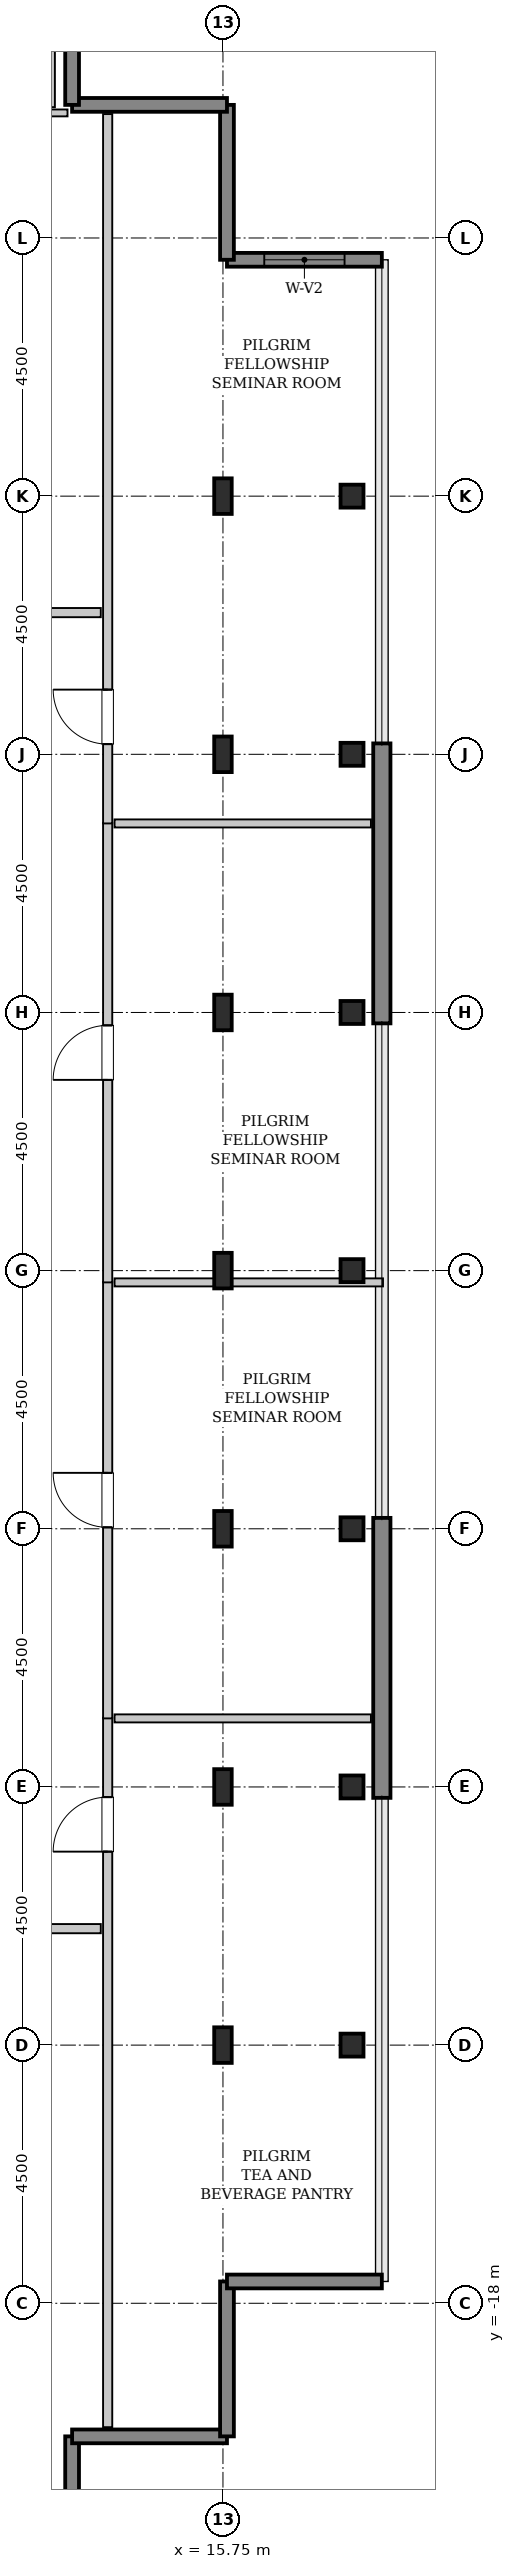
"""IFC4 building model, lengths in metres.
Left out: names, types, materials, properties, quantities, classifications, styles, units other than length and angle.
Written with IfcOpenShell. Run it as: python <this file> out.ifc"""

import sys

from ifc_helpers import new_model, si_unit, direction, frame, frame_2d, origin, origin_2d, place, context, subcontext, project, spatial, rectangle, hollow_rectangle, i_section, extrude, source, transform, mapped, element, fill, save


model = new_model("IFC4")
c1 = context("Model", 3, precision=1e-05, world=origin(), true_north=direction((0.0, 1.0)))
c2 = subcontext(c1, "Body", "Model", "MODEL_VIEW")
j1 = project(units=[si_unit("LENGTHUNIT", "METRE"), si_unit("PLANEANGLEUNIT", "RADIAN")], contexts=[c1])
p1 = place(None, origin())
s1 = spatial("IfcSite", under=j1, at=p1, CompositionType="ELEMENT")
p2 = place(p1, origin())
s2 = spatial("IfcBuilding", under=s1, at=p2, CompositionType="ELEMENT")
p3 = place(p2, frame((0.0, 0.0, 345.2)))
s3 = spatial("IfcBuildingStorey", under=s2, at=p3, CompositionType="ELEMENT", Elevation=345.2)
m1 = source(origin(), c2, "Body", "SweptSolid", [
    extrude(i_section(OverallWidth=0.305, OverallDepth=0.62, WebThickness=0.021, FlangeThickness=0.04, FilletRadius=0.027, at=origin_2d()), origin(), (0.0, 0.0, 1.0), 3.8),
])
for number, where, z_axis, x_axis in (
    (1, (15.75, -13.5, 0.0), (0.0, 0.0, 1.0), (1.0, 0.0, 0.0)),
    (2, (15.75, -9.0, 0.0), (0.0, 0.0, 1.0), (1.0, 0.0, 0.0)),
    (3, (15.75, -4.5, 0.0), (0.0, 0.0, 1.0), (1.0, 0.0, 0.0)),
    (4, (15.75, 0.0, 0.0), (0.0, 0.0, 1.0), (1.0, 0.0, 0.0)),
    (5, (15.75, 4.5, 0.0), (0.0, 0.0, 1.0), (1.0, 0.0, 0.0)),
    (6, (15.75, 9.0, 0.0), (0.0, 0.0, 1.0), (1.0, 0.0, 0.0)),
    (7, (15.75, 13.5, 0.0), (0.0, 0.0, 1.0), (1.0, 0.0, 0.0)),
):
    element("IfcColumn", number, at=place(p3, frame(where, z_axis=z_axis, x_axis=x_axis)), inside=s3, PredefinedType="COLUMN", context=c2, shape_type="MappedRepresentation", body=[
        mapped(m1, transform((0.0, 0.0, 0.0), x_axis=(1.0, 0.0, 0.0), y_axis=(0.0, 1.0, 0.0), z_axis=(0.0, 0.0, 1.0), scale=1.0)),
    ])
m2 = source(origin(), c2, "Body", "SweptSolid", [
    extrude(hollow_rectangle(XDim=0.4, YDim=0.4, WallThickness=0.02, InnerFilletRadius=0.02, OuterFilletRadius=0.04, at=origin_2d()), origin(), (0.0, 0.0, 1.0), 3.8),
])
for number, where, z_axis, x_axis in (
    (8, (18.0, -13.5, 0.0), (0.0, 0.0, 1.0), (1.0, 0.0, 0.0)),
    (9, (18.0, -9.0, 0.0), (0.0, 0.0, 1.0), (1.0, 0.0, 0.0)),
    (10, (18.0, -4.5, 0.0), (0.0, 0.0, 1.0), (1.0, 0.0, 0.0)),
    (11, (18.0, 0.0, 0.0), (0.0, 0.0, 1.0), (1.0, 0.0, 0.0)),
    (12, (18.0, 4.5, 0.0), (0.0, 0.0, 1.0), (1.0, 0.0, 0.0)),
    (13, (18.0, 9.0, 0.0), (0.0, 0.0, 1.0), (1.0, 0.0, 0.0)),
    (14, (18.0, 13.5, 0.0), (0.0, 0.0, 1.0), (1.0, 0.0, 0.0)),
):
    element("IfcColumn", number, at=place(p3, frame(where, z_axis=z_axis, x_axis=x_axis)), inside=s3, PredefinedType="COLUMN", context=c2, shape_type="MappedRepresentation", body=[
        mapped(m2, transform((0.0, 0.0, 0.0), x_axis=(1.0, 0.0, 0.0), y_axis=(0.0, 1.0, 0.0), z_axis=(0.0, 0.0, 1.0), scale=1.0)),
    ])
m3 = source(origin(), c2, "Body", "SweptSolid", [
    extrude(rectangle(XDim=4.88, YDim=0.3, at=frame_2d((2.44, 0.0))), origin(), (0.0, 0.0, 1.0), 3.5),
])
for number, where, z_axis, x_axis in (
    (15, (18.52, -9.19, 0.0), (0.0, 0.0, 1.0), (0.0, 1.0, 0.0)),
    (16, (18.52, 4.31, 0.0), (0.0, 0.0, 1.0), (0.0, 1.0, 0.0)),
):
    element("IfcWall", number, at=place(p3, frame(where, z_axis=z_axis, x_axis=x_axis)), inside=s3, PredefinedType="SHEAR", context=c2, shape_type="MappedRepresentation", body=[
        mapped(m3, transform((0.0, 0.0, 0.0), x_axis=(1.0, 0.0, 0.0), y_axis=(0.0, 1.0, 0.0), z_axis=(0.0, 0.0, 1.0), scale=1.0)),
    ])
m4 = source(origin(), c2, "Body", "SweptSolid", [
    extrude(rectangle(XDim=2.7, YDim=0.24, at=frame_2d((1.35, 0.0))), origin(), (0.0, 0.0, 1.0), 3.5),
])
p4 = place(p3, frame((18.52, 17.62, 0.0), z_axis=(0.0, 0.0, 1.0), x_axis=(-1.0, 0.0, 0.0)))
e17 = element("IfcWall", 17, at=p4, inside=s3, PredefinedType="SHEAR", context=c2, shape_type="MappedRepresentation", body=[
    mapped(m4, transform((0.0, 0.0, 0.0), x_axis=(1.0, 0.0, 0.0), y_axis=(0.0, 1.0, 0.0), z_axis=(0.0, 0.0, 1.0), scale=1.0)),
])
p5 = place(p4, frame((0.65, 0.0, 0.85)))
e18 = element("IfcOpeningElement", 18, at=p5, cuts=e17, PredefinedType="OPENING", context=c2, shape_type="SweptSolid", body=[
    extrude(rectangle(XDim=1.4, YDim=1.8, at=frame_2d((0.7, 0.9))), frame((0.0, 0.13, 0.0), z_axis=(0.0, -1.0, 0.0), x_axis=(1.0, 0.0, 0.0)), (0.0, 0.0, 1.0), 0.26),
])
for number, where, z_axis, x_axis in (
    (19, (15.82, 17.62, 0.0), (0.0, 0.0, 1.0), (0.0, 1.0, 0.0)),
    (20, (15.82, 20.32, 0.0), (0.0, 0.0, 1.0), (-1.0, 0.0, 0.0)),
    (21, (13.12, 20.32, 0.0), (0.0, 0.0, 1.0), (0.0, 1.0, 0.0)),
    (22, (13.12, -23.02, 0.0), (0.0, 0.0, 1.0), (0.0, 1.0, 0.0)),
    (23, (13.12, -20.32, 0.0), (0.0, 0.0, 1.0), (1.0, 0.0, 0.0)),
    (24, (15.82, -20.32, 0.0), (0.0, 0.0, 1.0), (0.0, 1.0, 0.0)),
    (25, (15.82, -17.62, 0.0), (0.0, 0.0, 1.0), (1.0, 0.0, 0.0)),
):
    element("IfcWall", number, at=place(p3, frame(where, z_axis=z_axis, x_axis=x_axis)), inside=s3, PredefinedType="SHEAR", context=c2, shape_type="MappedRepresentation", body=[
        mapped(m4, transform((0.0, 0.0, 0.0), x_axis=(1.0, 0.0, 0.0), y_axis=(0.0, 1.0, 0.0), z_axis=(0.0, 0.0, 1.0), scale=1.0)),
    ])
m5 = source(origin(), c2, "Body", "SweptSolid", [
    extrude(rectangle(XDim=2.86, YDim=0.12, at=frame_2d((1.43, 0.0))), origin(), (0.0, 0.0, 1.0), 3.485),
])
p6 = place(p3, frame((10.18, 20.18, 0.0), z_axis=(0.0, 0.0, 1.0), x_axis=(1.0, 0.0, 0.0)))
e26 = element("IfcWall", 26, at=p6, inside=s3, PredefinedType="PLUMBINGWALL", context=c2, shape_type="MappedRepresentation", body=[
    mapped(m5, transform((0.0, 0.0, 0.0), x_axis=(1.0, 0.0, 0.0), y_axis=(0.0, 1.0, 0.0), z_axis=(0.0, 0.0, 1.0), scale=1.0)),
])
p7 = place(p6, frame((0.895, 0.0, 0.0)))
e27 = element("IfcOpeningElement", 27, at=p7, cuts=e26, PredefinedType="OPENING", context=c2, shape_type="SweptSolid", body=[
    extrude(rectangle(XDim=0.85, YDim=2.1, at=frame_2d((0.425, 1.05))), frame((0.0, 0.07, 0.0), z_axis=(0.0, -1.0, 0.0), x_axis=(1.0, 0.0, 0.0)), (0.0, 0.0, 1.0), 0.14),
])
m6 = source(origin(), c2, "Body", "SweptSolid", [
    extrude(rectangle(XDim=2.76, YDim=0.12, at=frame_2d((1.38, 0.0))), origin(), (0.0, 0.0, 1.0), 3.485),
])
p8 = place(p3, frame((12.76, 20.28, 0.0), z_axis=(0.0, 0.0, 1.0), x_axis=(0.0, 1.0, 0.0)))
e28 = element("IfcWall", 28, at=p8, inside=s3, PredefinedType="PLUMBINGWALL", context=c2, shape_type="MappedRepresentation", body=[
    mapped(m6, transform((0.0, 0.0, 0.0), x_axis=(1.0, 0.0, 0.0), y_axis=(0.0, 1.0, 0.0), z_axis=(0.0, 0.0, 1.0), scale=1.0)),
])
m7 = source(origin(), c2, "Body", "SweptSolid", [
    extrude(rectangle(XDim=12.365, YDim=0.16, at=frame_2d((6.183, 0.0))), origin(), (0.0, 0.0, 1.0), 3.485),
])
p9 = place(p3, frame((13.74, -20.16, 0.0), z_axis=(0.0, 0.0, 1.0), x_axis=(0.0, 1.0, 0.0)))
e29 = element("IfcWall", 29, at=p9, inside=s3, PredefinedType="PARTITIONING", context=c2, shape_type="MappedRepresentation", body=[
    mapped(m7, transform((0.0, 0.0, 0.0), x_axis=(1.0, 0.0, 0.0), y_axis=(0.0, 1.0, 0.0), z_axis=(0.0, 0.0, 1.0), scale=1.0)),
])
p10 = place(p9, frame((10.032, 0.0, 0.0)))
e30 = element("IfcOpeningElement", 30, at=p10, cuts=e29, PredefinedType="OPENING", context=c2, shape_type="SweptSolid", body=[
    extrude(rectangle(XDim=0.95, YDim=2.1, at=frame_2d((0.475, 1.05))), frame((0.0, 0.09, 0.0), z_axis=(0.0, -1.0, 0.0), x_axis=(1.0, 0.0, 0.0)), (0.0, 0.0, 1.0), 0.18),
])
m8 = source(origin(), c2, "Body", "SweptSolid", [
    extrude(rectangle(XDim=4.47, YDim=0.14, at=frame_2d((2.235, 0.0))), origin(), (0.0, 0.0, 1.0), 3.485),
])
p11 = place(p3, frame((13.86, -7.805, 0.0), z_axis=(0.0, 0.0, 1.0), x_axis=(1.0, 0.0, 0.0)))
e31 = element("IfcWall", 31, at=p11, inside=s3, PredefinedType="PARTITIONING", context=c2, shape_type="MappedRepresentation", body=[
    mapped(m8, transform((0.0, 0.0, 0.0), x_axis=(1.0, 0.0, 0.0), y_axis=(0.0, 1.0, 0.0), z_axis=(0.0, 0.0, 1.0), scale=1.0)),
])
m9 = source(origin(), c2, "Body", "SweptSolid", [
    extrude(rectangle(XDim=7.61, YDim=0.16, at=frame_2d((3.805, 0.0))), origin(), (0.0, 0.0, 1.0), 3.485),
])
p12 = place(p3, frame((13.74, -7.805, 0.0), z_axis=(0.0, 0.0, 1.0), x_axis=(0.0, 1.0, 0.0)))
e32 = element("IfcWall", 32, at=p12, inside=s3, PredefinedType="PARTITIONING", context=c2, shape_type="MappedRepresentation", body=[
    mapped(m9, transform((0.0, 0.0, 0.0), x_axis=(1.0, 0.0, 0.0), y_axis=(0.0, 1.0, 0.0), z_axis=(0.0, 0.0, 1.0), scale=1.0)),
])
p13 = place(p12, frame((3.33, 0.0, 0.0)))
e33 = element("IfcOpeningElement", 33, at=p13, cuts=e32, PredefinedType="OPENING", context=c2, shape_type="SweptSolid", body=[
    extrude(rectangle(XDim=0.95, YDim=2.1, at=frame_2d((0.475, 1.05))), frame((0.0, 0.09, 0.0), z_axis=(0.0, -1.0, 0.0), x_axis=(1.0, 0.0, 0.0)), (0.0, 0.0, 1.0), 0.18),
])
m10 = source(origin(), c2, "Body", "SweptSolid", [
    extrude(rectangle(XDim=4.68, YDim=0.14, at=frame_2d((2.34, 0.0))), origin(), (0.0, 0.0, 1.0), 2.925),
])
p14 = place(p3, frame((13.86, -0.205, 0.0), z_axis=(0.0, 0.0, 1.0), x_axis=(1.0, 0.0, 0.0)))
e34 = element("IfcWall", 34, at=p14, inside=s3, PredefinedType="PARTITIONING", context=c2, shape_type="MappedRepresentation", body=[
    mapped(m10, transform((0.0, 0.0, 0.0), x_axis=(1.0, 0.0, 0.0), y_axis=(0.0, 1.0, 0.0), z_axis=(0.0, 0.0, 1.0), scale=1.0)),
])
m11 = source(origin(), c2, "Body", "SweptSolid", [
    extrude(rectangle(XDim=8.01, YDim=0.16, at=frame_2d((4.005, 0.0))), origin(), (0.0, 0.0, 1.0), 3.485),
])
p15 = place(p3, frame((13.74, -0.205, 0.0), z_axis=(0.0, 0.0, 1.0), x_axis=(0.0, 1.0, 0.0)))
e35 = element("IfcWall", 35, at=p15, inside=s3, PredefinedType="PARTITIONING", context=c2, shape_type="MappedRepresentation", body=[
    mapped(m11, transform((0.0, 0.0, 0.0), x_axis=(1.0, 0.0, 0.0), y_axis=(0.0, 1.0, 0.0), z_axis=(0.0, 0.0, 1.0), scale=1.0)),
])
p16 = place(p15, frame((3.53, 0.0, 0.0)))
e36 = element("IfcOpeningElement", 36, at=p16, cuts=e35, PredefinedType="OPENING", context=c2, shape_type="SweptSolid", body=[
    extrude(rectangle(XDim=0.95, YDim=2.1, at=frame_2d((0.475, 1.05))), frame((0.0, 0.09, 0.0), z_axis=(0.0, -1.0, 0.0), x_axis=(1.0, 0.0, 0.0)), (0.0, 0.0, 1.0), 0.18),
])
p17 = place(p3, frame((13.86, 7.795, 0.0), z_axis=(0.0, 0.0, 1.0), x_axis=(1.0, 0.0, 0.0)))
e37 = element("IfcWall", 37, at=p17, inside=s3, PredefinedType="PARTITIONING", context=c2, shape_type="MappedRepresentation", body=[
    mapped(m8, transform((0.0, 0.0, 0.0), x_axis=(1.0, 0.0, 0.0), y_axis=(0.0, 1.0, 0.0), z_axis=(0.0, 0.0, 1.0), scale=1.0)),
])
p18 = place(p3, frame((13.74, 7.795, 0.0), z_axis=(0.0, 0.0, 1.0), x_axis=(0.0, 1.0, 0.0)))
e38 = element("IfcWall", 38, at=p18, inside=s3, PredefinedType="PARTITIONING", context=c2, shape_type="MappedRepresentation", body=[
    mapped(m7, transform((0.0, 0.0, 0.0), x_axis=(1.0, 0.0, 0.0), y_axis=(0.0, 1.0, 0.0), z_axis=(0.0, 0.0, 1.0), scale=1.0)),
])
p19 = place(p18, frame((1.383, 0.0, 0.0)))
e39 = element("IfcOpeningElement", 39, at=p19, cuts=e38, PredefinedType="OPENING", context=c2, shape_type="SweptSolid", body=[
    extrude(rectangle(XDim=0.95, YDim=2.1, at=frame_2d((0.475, 1.05))), frame((0.0, 0.09, 0.0), z_axis=(0.0, -1.0, 0.0), x_axis=(1.0, 0.0, 0.0)), (0.0, 0.0, 1.0), 0.18),
])
m12 = source(origin(), c2, "Body", "SweptSolid", [
    extrude(rectangle(XDim=3.66, YDim=0.16, at=frame_2d((1.83, 0.0))), origin(), (0.0, 0.0, 1.0), 3.485),
])
p20 = place(p3, frame((9.96, 11.47, 0.0), z_axis=(0.0, 0.0, 1.0), x_axis=(1.0, 0.0, 0.0)))
e40 = element("IfcWall", 40, at=p20, inside=s3, PredefinedType="PARTITIONING", context=c2, shape_type="MappedRepresentation", body=[
    mapped(m12, transform((0.0, 0.0, 0.0), x_axis=(1.0, 0.0, 0.0), y_axis=(0.0, 1.0, 0.0), z_axis=(0.0, 0.0, 1.0), scale=1.0)),
])
p21 = place(p20, frame((1.355, 0.0, 0.0)))
e41 = element("IfcOpeningElement", 41, at=p21, cuts=e40, PredefinedType="OPENING", context=c2, shape_type="SweptSolid", body=[
    extrude(rectangle(XDim=0.95, YDim=2.1, at=frame_2d((0.475, 1.05))), frame((0.0, 0.09, 0.0), z_axis=(0.0, -1.0, 0.0), x_axis=(1.0, 0.0, 0.0)), (0.0, 0.0, 1.0), 0.18),
])
m13 = source(origin(), c2, "Body", "SweptSolid", [
    extrude(rectangle(XDim=5.225, YDim=0.16, at=frame_2d((2.613, 0.0))), origin(), (0.0, 0.0, 1.0), 3.485),
])
p22 = place(p3, frame((8.395, -11.47, 0.0), z_axis=(0.0, 0.0, 1.0), x_axis=(1.0, 0.0, 0.0)))
e42 = element("IfcWall", 42, at=p22, inside=s3, PredefinedType="PARTITIONING", context=c2, shape_type="MappedRepresentation", body=[
    mapped(m13, transform((0.0, 0.0, 0.0), x_axis=(1.0, 0.0, 0.0), y_axis=(0.0, 1.0, 0.0), z_axis=(0.0, 0.0, 1.0), scale=1.0)),
])
p23 = place(p22, frame((2.137, 0.0, 0.0)))
e43 = element("IfcOpeningElement", 43, at=p23, cuts=e42, PredefinedType="OPENING", context=c2, shape_type="SweptSolid", body=[
    extrude(rectangle(XDim=0.95, YDim=2.1, at=frame_2d((0.475, 1.05))), frame((0.0, 0.09, 0.0), z_axis=(0.0, -1.0, 0.0), x_axis=(1.0, 0.0, 0.0)), (0.0, 0.0, 1.0), 0.18),
])
m14 = source(origin(), c2, "Body", "SweptSolid", [
    extrude(rectangle(XDim=1.4, YDim=1.8, at=frame_2d((0.7, 0.9))), frame((0.0, 0.03, 0.0), z_axis=(0.0, -1.0, 0.0), x_axis=(1.0, 0.0, 0.0)), (0.0, 0.0, 1.0), 0.06),
])
p24 = place(p5, origin())
e44 = element("IfcWindow", 44, at=p24, inside=s3, PartitioningType="SINGLE_PANEL", PredefinedType="WINDOW", context=c2, shape_type="MappedRepresentation", body=[
    mapped(m14, transform((0.0, 0.0, 0.0), x_axis=(1.0, 0.0, 0.0), y_axis=(0.0, 1.0, 0.0), z_axis=(0.0, 0.0, 1.0), scale=1.0)),
])
fill(e18, e44)
m15 = source(origin(), c2, "Body", "SweptSolid", [
    extrude(rectangle(XDim=0.95, YDim=2.1, at=frame_2d((0.475, 1.05))), frame((0.0, 0.025, 0.0), z_axis=(0.0, -1.0, 0.0), x_axis=(1.0, 0.0, 0.0)), (0.0, 0.0, 1.0), 0.05),
])
p25 = place(p10, origin())
e45 = element("IfcDoor", 45, at=p25, inside=s3, OperationType="SINGLE_SWING_LEFT", PredefinedType="DOOR", context=c2, shape_type="MappedRepresentation", body=[
    mapped(m15, transform((0.0, 0.0, 0.0), x_axis=(1.0, 0.0, 0.0), y_axis=(0.0, 1.0, 0.0), z_axis=(0.0, 0.0, 1.0), scale=1.0)),
])
fill(e30, e45)
p26 = place(p13, origin())
e46 = element("IfcDoor", 46, at=p26, inside=s3, OperationType="SINGLE_SWING_RIGHT", PredefinedType="DOOR", context=c2, shape_type="MappedRepresentation", body=[
    mapped(m15, transform((0.0, 0.0, 0.0), x_axis=(1.0, 0.0, 0.0), y_axis=(0.0, 1.0, 0.0), z_axis=(0.0, 0.0, 1.0), scale=1.0)),
])
fill(e33, e46)
p27 = place(p16, origin())
e47 = element("IfcDoor", 47, at=p27, inside=s3, OperationType="SINGLE_SWING_LEFT", PredefinedType="DOOR", context=c2, shape_type="MappedRepresentation", body=[
    mapped(m15, transform((0.0, 0.0, 0.0), x_axis=(1.0, 0.0, 0.0), y_axis=(0.0, 1.0, 0.0), z_axis=(0.0, 0.0, 1.0), scale=1.0)),
])
fill(e36, e47)
p28 = place(p19, origin())
e48 = element("IfcDoor", 48, at=p28, inside=s3, OperationType="SINGLE_SWING_RIGHT", PredefinedType="DOOR", context=c2, shape_type="MappedRepresentation", body=[
    mapped(m15, transform((0.0, 0.0, 0.0), x_axis=(1.0, 0.0, 0.0), y_axis=(0.0, 1.0, 0.0), z_axis=(0.0, 0.0, 1.0), scale=1.0)),
])
fill(e39, e48)
save(model, sys.argv[1])
